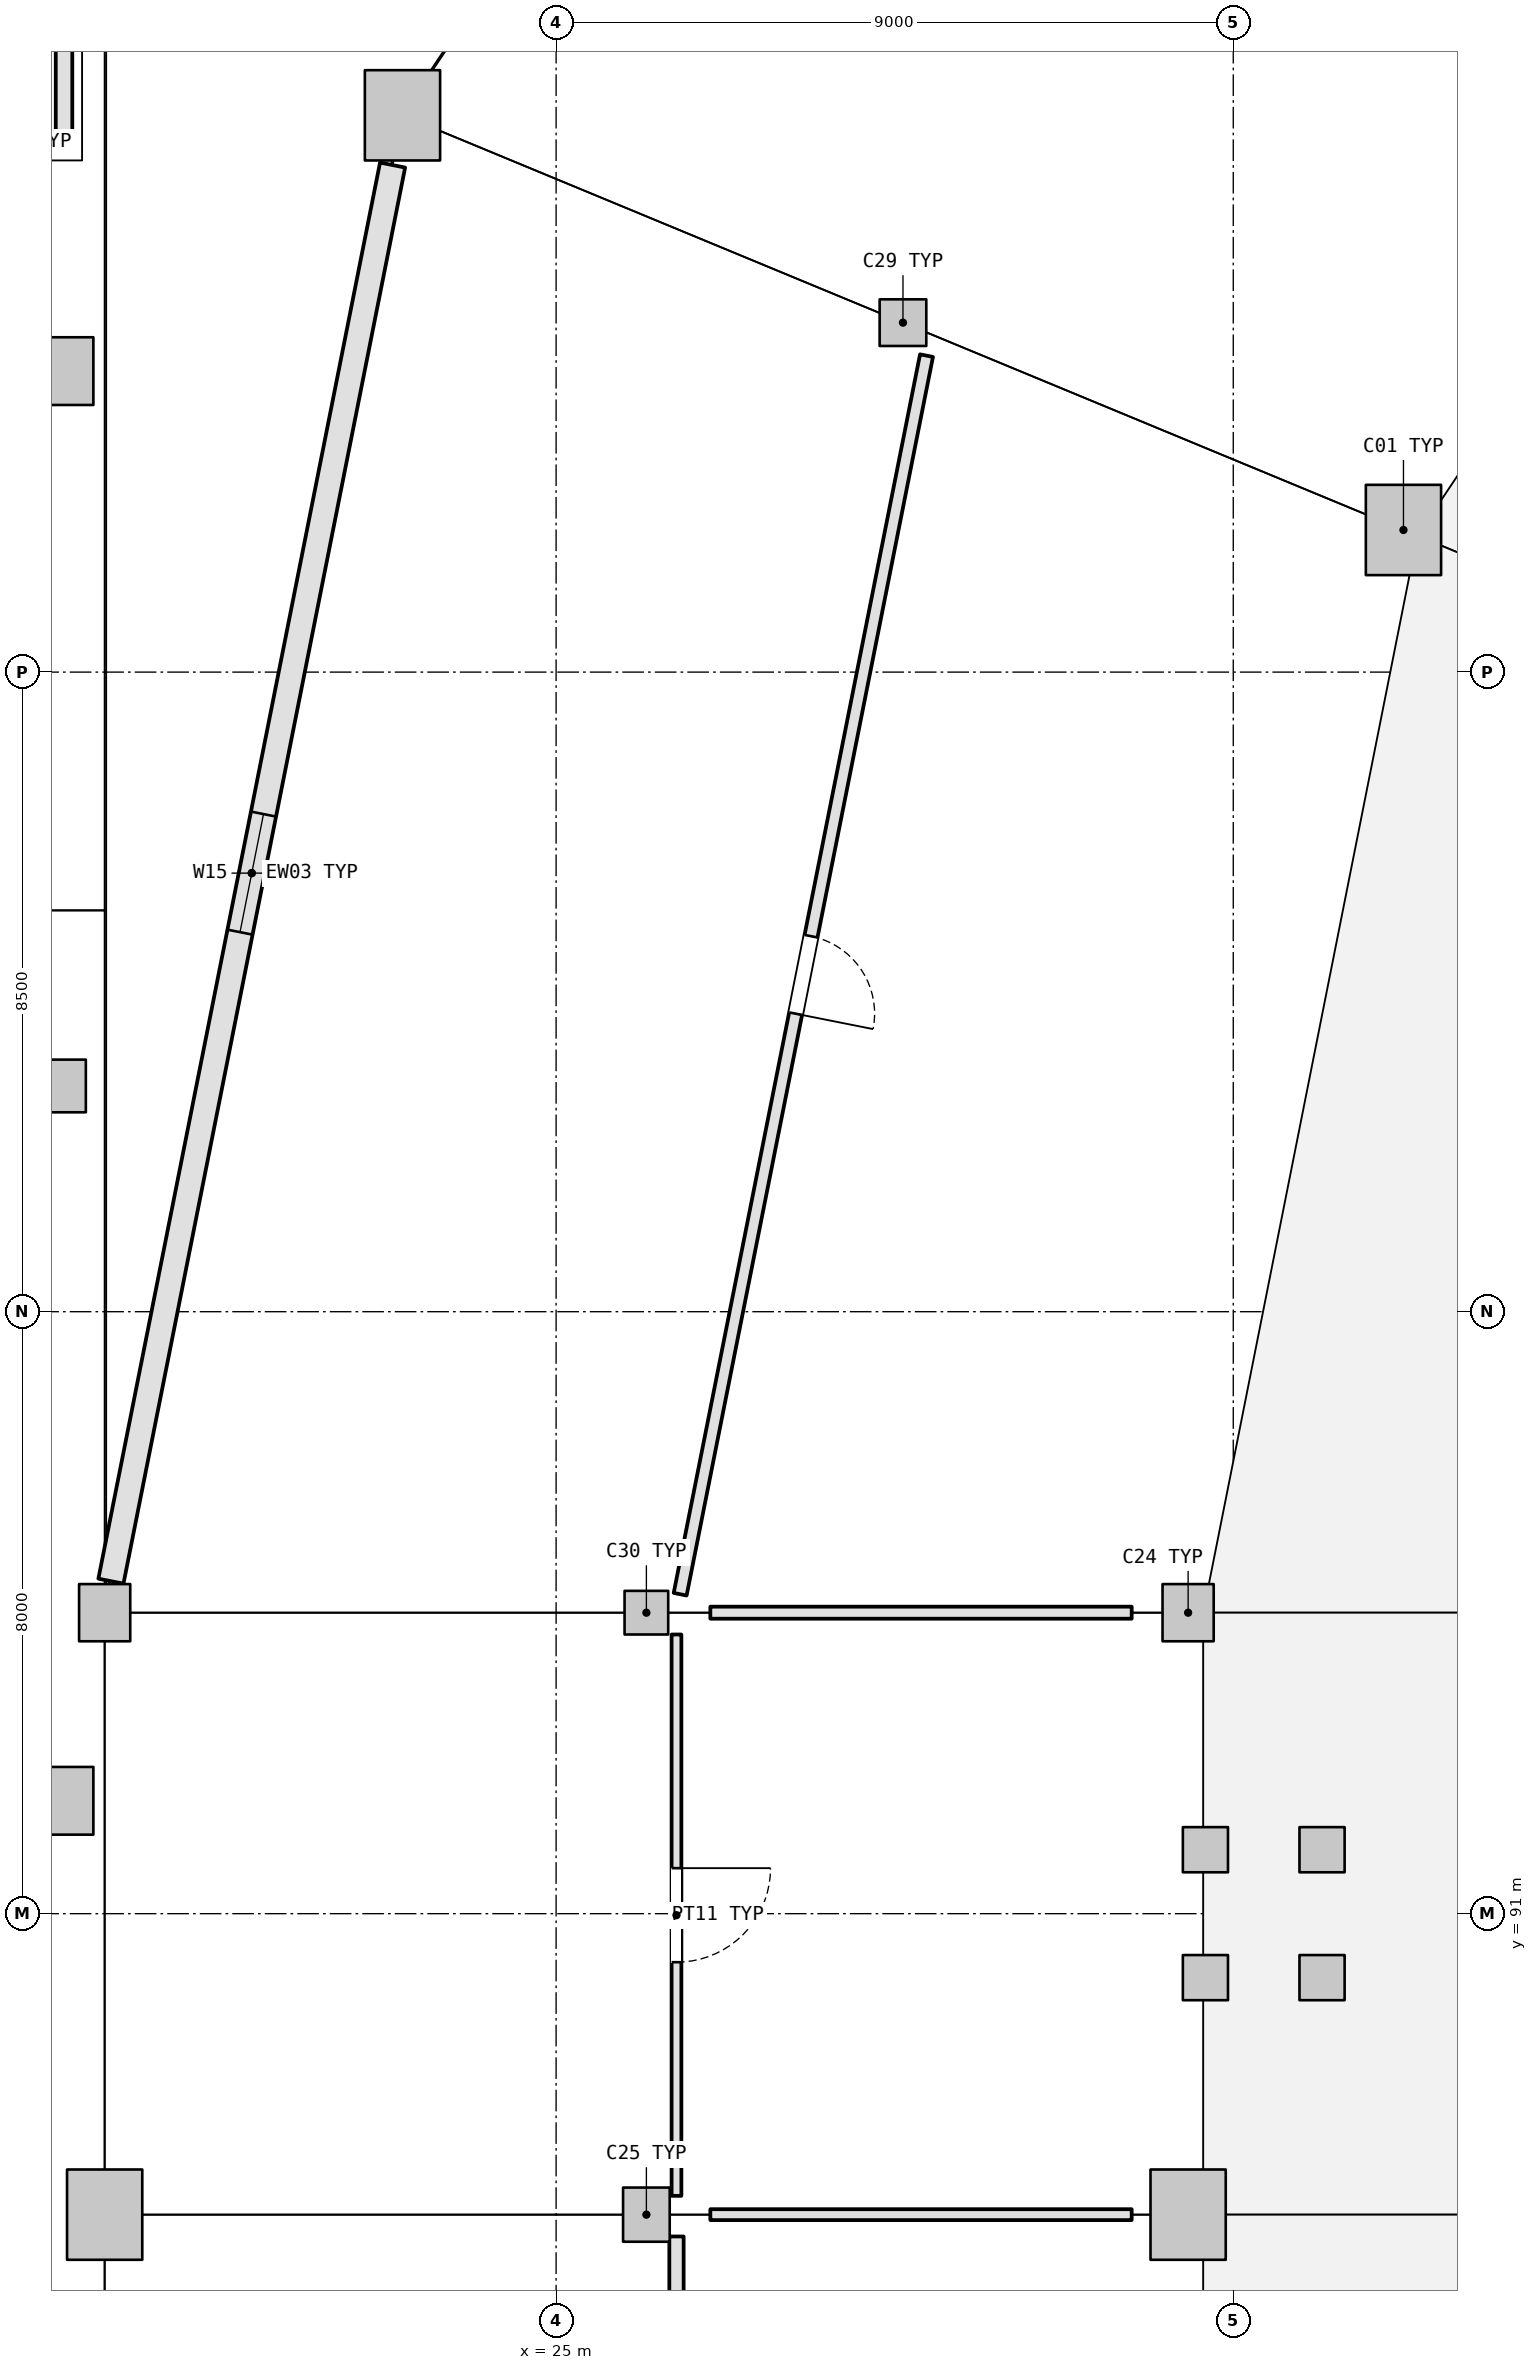
"""IFC4 building model, lengths in metres.
Left out: names, types, materials, properties, quantities, classifications, styles, units other than length and angle.
Written with IfcOpenShell. Run it as: python <this file> out.ifc"""

import sys

from ifc_helpers import new_model, si_unit, direction, frame, frame_2d, origin, origin_2d, place, context, subcontext, project, spatial, rectangle, extrude, element, fill, save


model = new_model("IFC4")
c1 = context("Model", 3, precision=1e-05, world=origin(), true_north=direction((0.0, 1.0)))
c2 = subcontext(c1, "Body", "Model", "MODEL_VIEW")
j1 = project(units=[si_unit("LENGTHUNIT", "METRE"), si_unit("PLANEANGLEUNIT", "RADIAN")], contexts=[c1])
p1 = place(None, origin())
s1 = spatial("IfcSite", under=j1, at=p1, CompositionType="ELEMENT")
p2 = place(p1, origin())
s2 = spatial("IfcBuilding", under=s1, at=p2, CompositionType="ELEMENT")
p3 = place(p2, origin())
s3 = spatial("IfcBuildingStorey", under=s2, at=p3, CompositionType="ELEMENT", Elevation=0.0)
p4 = place(p3, frame((36.262, 109.389, 0.0), z_axis=(0.0, 0.0, 1.0), x_axis=(1.0, 0.0, 0.0)))
e1 = element("IfcColumn", 1, at=p4, inside=s3, PredefinedType="COLUMN", context=c2, shape_type="SweptSolid", body=[
    extrude(rectangle(XDim=1.0, YDim=1.2, at=origin_2d()), origin(), (0.0, 0.0, 1.0), 5.4),
])
p5 = place(p3, frame((29.61, 112.144, 0.0), z_axis=(0.0, 0.0, 1.0), x_axis=(1.0, 0.0, 0.0)))
e2 = element("IfcColumn", 2, at=p5, inside=s3, PredefinedType="COLUMN", context=c2, shape_type="SweptSolid", body=[
    extrude(rectangle(XDim=0.62, YDim=0.62, at=origin_2d()), origin(), (0.0, 0.0, 1.0), 5.4),
])
p6 = place(p3, frame((22.958, 114.9, 0.0), z_axis=(0.0, 0.0, 1.0), x_axis=(1.0, 0.0, 0.0)))
e3 = element("IfcColumn", 3, at=p6, inside=s3, PredefinedType="COLUMN", context=c2, shape_type="SweptSolid", body=[
    extrude(rectangle(XDim=1.0, YDim=1.2, at=origin_2d()), origin(), (0.0, 0.0, 1.0), 5.4),
])
p7 = place(p3, frame((33.4, 95.0, 0.0), z_axis=(0.0, 0.0, 1.0), x_axis=(1.0, 0.0, 0.0)))
e4 = element("IfcColumn", 4, at=p7, inside=s3, PredefinedType="COLUMN", context=c2, shape_type="SweptSolid", body=[
    extrude(rectangle(XDim=0.68, YDim=0.76, at=origin_2d()), origin(), (0.0, 0.0, 1.0), 5.4),
])
p8 = place(p3, frame((26.2, 95.0, 0.0), z_axis=(0.0, 0.0, 1.0), x_axis=(1.0, 0.0, 0.0)))
e5 = element("IfcColumn", 5, at=p8, inside=s3, PredefinedType="COLUMN", context=c2, shape_type="SweptSolid", body=[
    extrude(rectangle(XDim=0.58, YDim=0.58, at=origin_2d()), origin(), (0.0, 0.0, 1.0), 5.4),
])
p9 = place(p3, frame((19.0, 95.0, 0.0), z_axis=(0.0, 0.0, 1.0), x_axis=(1.0, 0.0, 0.0)))
e6 = element("IfcColumn", 6, at=p9, inside=s3, PredefinedType="COLUMN", context=c2, shape_type="SweptSolid", body=[
    extrude(rectangle(XDim=0.68, YDim=0.76, at=origin_2d()), origin(), (0.0, 0.0, 1.0), 5.4),
])
p10 = place(p3, frame((33.4, 87.0, 0.0), z_axis=(0.0, 0.0, 1.0), x_axis=(1.0, 0.0, 0.0)))
e7 = element("IfcColumn", 7, at=p10, inside=s3, PredefinedType="COLUMN", context=c2, shape_type="SweptSolid", body=[
    extrude(rectangle(XDim=1.0, YDim=1.2, at=origin_2d()), origin(), (0.0, 0.0, 1.0), 5.4),
])
p11 = place(p3, frame((26.2, 87.0, 0.0), z_axis=(0.0, 0.0, 1.0), x_axis=(1.0, 0.0, 0.0)))
e8 = element("IfcColumn", 8, at=p11, inside=s3, PredefinedType="COLUMN", context=c2, shape_type="SweptSolid", body=[
    extrude(rectangle(XDim=0.62, YDim=0.72, at=origin_2d()), origin(), (0.0, 0.0, 1.0), 5.4),
])
p12 = place(p3, frame((19.0, 87.0, 0.0), z_axis=(0.0, 0.0, 1.0), x_axis=(1.0, 0.0, 0.0)))
e9 = element("IfcColumn", 9, at=p12, inside=s3, PredefinedType="COLUMN", context=c2, shape_type="SweptSolid", body=[
    extrude(rectangle(XDim=1.0, YDim=1.2, at=origin_2d()), origin(), (0.0, 0.0, 1.0), 5.4),
])
p13 = place(p3, frame((18.4, 92.5, 0.0), z_axis=(0.0, 0.0, 1.0), x_axis=(1.0, 0.0, 0.0)))
e10 = element("IfcColumn", 10, at=p13, inside=s3, PredefinedType="COLUMN", context=c2, shape_type="SweptSolid", body=[
    extrude(rectangle(XDim=0.9, YDim=0.9, at=origin_2d()), origin(), (0.0, 0.0, 1.0), 5.4),
])
p14 = place(p3, frame((18.4, 102.0, 0.0), z_axis=(0.0, 0.0, 1.0), x_axis=(1.0, 0.0, 0.0)))
e11 = element("IfcColumn", 11, at=p14, inside=s3, PredefinedType="COLUMN", context=c2, shape_type="SweptSolid", body=[
    extrude(rectangle(XDim=0.7, YDim=0.7, at=origin_2d()), origin(), (0.0, 0.0, 1.0), 5.4),
])
p15 = place(p3, frame((18.4, 111.5, 0.0), z_axis=(0.0, 0.0, 1.0), x_axis=(1.0, 0.0, 0.0)))
e12 = element("IfcColumn", 12, at=p15, inside=s3, PredefinedType="COLUMN", context=c2, shape_type="SweptSolid", body=[
    extrude(rectangle(XDim=0.9, YDim=0.9, at=origin_2d()), origin(), (0.0, 0.0, 1.0), 5.4),
])
p16 = place(p3, frame((22.827, 114.239, 0.0), z_axis=(0.0, 0.0, 1.0), x_axis=(-0.19509817024, -0.980783719262, 0.0)))
e13 = element("IfcWall", 13, at=p16, inside=s3, PredefinedType="SOLIDWALL", context=c2, shape_type="SweptSolid", body=[
    extrude(rectangle(XDim=19.188, YDim=0.34, at=frame_2d((9.594, 0.0))), origin(), (0.0, 0.0, 1.0), 4.275),
])
p17 = place(p16, frame((8.794, 0.0, 2.4)))
e14 = element("IfcOpeningElement", 14, at=p17, cuts=e13, PredefinedType="OPENING", context=c2, shape_type="SweptSolid", body=[
    extrude(rectangle(XDim=1.6, YDim=1.2, at=frame_2d((0.8, 0.6))), frame((0.0, 0.18, 0.0), z_axis=(0.0, -1.0, 0.0), x_axis=(1.0, 0.0, 0.0)), (0.0, 0.0, 1.0), 0.36),
])
for number, where, z_axis, x_axis in (
    (15, (33.63, 90.15, 0.0), (0.0, 0.0, 1.0), (1.0, 0.0, 0.0)),
    (16, (35.18, 90.15, 0.0), (0.0, 0.0, 1.0), (1.0, 0.0, 0.0)),
    (17, (35.18, 91.85, 0.0), (0.0, 0.0, 1.0), (1.0, 0.0, 0.0)),
    (18, (33.63, 91.85, 0.0), (0.0, 0.0, 1.0), (1.0, 0.0, 0.0)),
):
    element("IfcColumn", number, at=place(p3, frame(where, z_axis=z_axis, x_axis=x_axis)), inside=s3, PredefinedType="COLUMN", context=c2, shape_type="SweptSolid", body=[
        extrude(rectangle(XDim=0.6, YDim=0.6, at=origin_2d()), origin(), (0.0, 0.0, 1.0), 5.4),
    ])
p18 = place(p3, frame((16.34, 114.54, -1.1), z_axis=(0.0, 0.0, 1.0), x_axis=(1.0, 0.0, 0.0)))
e19 = element("IfcWall", 19, at=p18, inside=s3, PredefinedType="SHEAR", context=c2, shape_type="SweptSolid", body=[
    extrude(rectangle(XDim=2.12, YDim=0.22, at=frame_2d((1.06, 0.0))), origin(), (0.0, 0.0, 1.0), 6.24),
])
p19 = place(p3, frame((18.46, 114.54, -1.1), z_axis=(0.0, 0.0, 1.0), x_axis=(0.0, 1.0, 0.0)))
e20 = element("IfcWall", 20, at=p19, inside=s3, PredefinedType="SHEAR", context=c2, shape_type="SweptSolid", body=[
    extrude(rectangle(XDim=2.92, YDim=0.22, at=frame_2d((1.46, 0.0))), origin(), (0.0, 0.0, 1.0), 6.24),
])
p20 = place(p3, frame((26.649, 95.245, 0.0), z_axis=(0.0, 0.0, 1.0), x_axis=(0.195100557291, 0.980783244425, 0.0)))
e21 = element("IfcWall", 21, at=p20, inside=s3, PredefinedType="PARTITIONING", context=c2, shape_type="SweptSolid", body=[
    extrude(rectangle(XDim=16.783, YDim=0.175, at=frame_2d((8.392, 0.0))), origin(), (0.0, 0.0, 1.0), 4.305),
])
p21 = place(p20, frame((7.867, 0.0, 0.0)))
e22 = element("IfcOpeningElement", 22, at=p21, cuts=e21, PredefinedType="OPENING", context=c2, shape_type="SweptSolid", body=[
    extrude(rectangle(XDim=1.05, YDim=2.2, at=frame_2d((0.525, 1.1))), frame((0.0, 0.097, 0.0), z_axis=(0.0, -1.0, 0.0), x_axis=(1.0, 0.0, 0.0)), (0.0, 0.0, 1.0), 0.195),
])
p22 = place(p3, frame((32.65, 95.0, 0.0), z_axis=(0.0, 0.0, 1.0), x_axis=(-1.0, 0.0, 0.0)))
e23 = element("IfcWall", 23, at=p22, inside=s3, PredefinedType="PARTITIONING", context=c2, shape_type="SweptSolid", body=[
    extrude(rectangle(XDim=5.6, YDim=0.16, at=frame_2d((2.8, 0.0))), origin(), (0.0, 0.0, 1.0), 4.345),
])
p23 = place(p3, frame((26.6, 87.25, 0.0), z_axis=(0.0, 0.0, 1.0), x_axis=(0.0, 1.0, 0.0)))
e24 = element("IfcWall", 24, at=p23, inside=s3, PredefinedType="PARTITIONING", context=c2, shape_type="SweptSolid", body=[
    extrude(rectangle(XDim=7.46, YDim=0.13, at=frame_2d((3.73, 0.0))), origin(), (0.0, 0.0, 1.0), 4.345),
])
p24 = place(p23, frame((3.105, 0.0, 0.0)))
e25 = element("IfcOpeningElement", 25, at=p24, cuts=e24, PredefinedType="OPENING", context=c2, shape_type="SweptSolid", body=[
    extrude(rectangle(XDim=1.25, YDim=2.2, at=frame_2d((0.625, 1.1))), frame((0.0, 0.075, 0.0), z_axis=(0.0, -1.0, 0.0), x_axis=(1.0, 0.0, 0.0)), (0.0, 0.0, 1.0), 0.15),
])
p25 = place(p3, frame((32.65, 87.0, 0.0), z_axis=(0.0, 0.0, 1.0), x_axis=(-1.0, 0.0, 0.0)))
e26 = element("IfcWall", 26, at=p25, inside=s3, PredefinedType="PARTITIONING", context=c2, shape_type="SweptSolid", body=[
    extrude(rectangle(XDim=5.6, YDim=0.145, at=frame_2d((2.8, 0.0))), origin(), (0.0, 0.0, 1.0), 4.375),
])
p26 = place(p3, frame((26.6, 79.25, 0.0), z_axis=(0.0, 0.0, 1.0), x_axis=(0.0, 1.0, 0.0)))
e27 = element("IfcWall", 27, at=p26, inside=s3, PredefinedType="PARTITIONING", context=c2, shape_type="SweptSolid", body=[
    extrude(rectangle(XDim=7.46, YDim=0.19, at=frame_2d((3.73, 0.0))), origin(), (0.0, 0.0, 1.0), 4.375),
])
p27 = place(p26, frame((3.27, 0.0, 0.0)))
e28 = element("IfcOpeningElement", 28, at=p27, cuts=e27, PredefinedType="OPENING", context=c2, shape_type="SweptSolid", body=[
    extrude(rectangle(XDim=0.92, YDim=2.1, at=frame_2d((0.46, 1.05))), frame((0.0, 0.105, 0.0), z_axis=(0.0, -1.0, 0.0), x_axis=(1.0, 0.0, 0.0)), (0.0, 0.0, 1.0), 0.21),
])
p28 = place(p17, origin())
e29 = element("IfcWindow", 29, at=p28, inside=s3, PartitioningType="SINGLE_PANEL", PredefinedType="WINDOW", context=c2, shape_type="SweptSolid", body=[
    extrude(rectangle(XDim=1.6, YDim=1.2, at=frame_2d((0.8, 0.6))), frame((0.0, 0.03, 0.0), z_axis=(0.0, -1.0, 0.0), x_axis=(1.0, 0.0, 0.0)), (0.0, 0.0, 1.0), 0.06),
])
fill(e14, e29)
p29 = place(p21, frame((1.05, 0.0, 0.0), z_axis=(0.0, 0.0, 1.0), x_axis=(-1.0, 0.0, 0.0)))
e30 = element("IfcDoor", 30, at=p29, inside=s3, OperationType="SINGLE_SWING_LEFT", PredefinedType="DOOR", context=c2, shape_type="SweptSolid", body=[
    extrude(rectangle(XDim=1.05, YDim=2.2, at=frame_2d((0.525, 1.1))), frame((0.0, 0.025, 0.0), z_axis=(0.0, -1.0, 0.0), x_axis=(1.0, 0.0, 0.0)), (0.0, 0.0, 1.0), 0.05),
])
fill(e22, e30)
p30 = place(p24, frame((1.25, 0.0, 0.0), z_axis=(0.0, 0.0, 1.0), x_axis=(-1.0, 0.0, 0.0)))
e31 = element("IfcDoor", 31, at=p30, inside=s3, OperationType="SINGLE_SWING_RIGHT", PredefinedType="DOOR", context=c2, shape_type="SweptSolid", body=[
    extrude(rectangle(XDim=1.25, YDim=2.2, at=frame_2d((0.625, 1.1))), frame((0.0, 0.025, 0.0), z_axis=(0.0, -1.0, 0.0), x_axis=(1.0, 0.0, 0.0)), (0.0, 0.0, 1.0), 0.05),
])
fill(e25, e31)
save(model, sys.argv[1])
